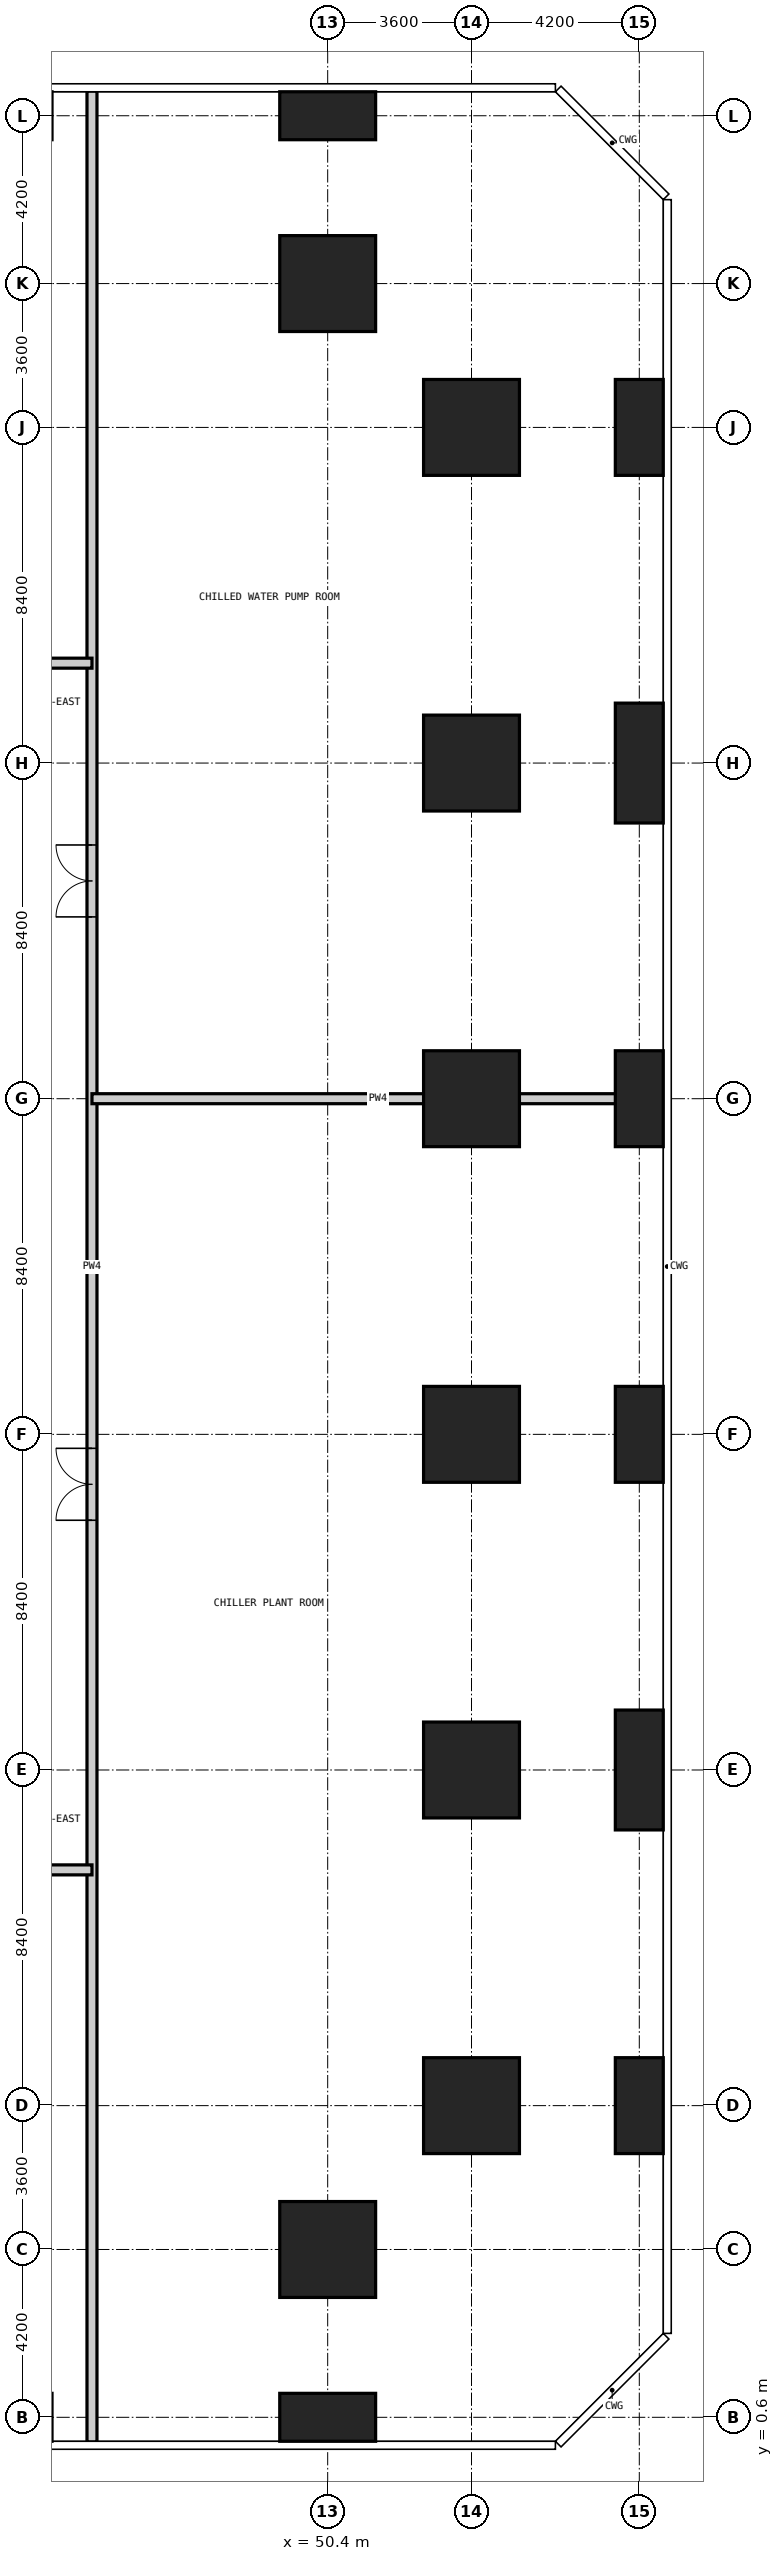
"""IFC4 building model, lengths in metres.
Left out: names, types, materials, properties, quantities, classifications, styles, units other than length and angle.
Written with IfcOpenShell. Run it as: python <this file> out.ifc"""

import sys

from ifc_helpers import new_model, si_unit, direction, frame, frame_2d, origin, origin_2d, place, context, subcontext, project, spatial, rectangle, extrude, element, fill, save


model = new_model("IFC4")
c1 = context("Model", 3, precision=1e-05, world=origin(), true_north=direction((0.0, 1.0)))
c2 = subcontext(c1, "Body", "Model", "MODEL_VIEW")
j1 = project(units=[si_unit("LENGTHUNIT", "METRE"), si_unit("PLANEANGLEUNIT", "RADIAN")], contexts=[c1])
p1 = place(None, origin())
s1 = spatial("IfcSite", under=j1, at=p1, CompositionType="ELEMENT")
p2 = place(p1, origin())
s2 = spatial("IfcBuilding", under=s1, at=p2, CompositionType="ELEMENT")
p3 = place(p2, frame((0.0, 0.0, 88.2)))
s3 = spatial("IfcBuildingStorey", under=s2, at=p3, CompositionType="ELEMENT", Elevation=88.2)
p4 = place(p3, frame((50.4, 0.6, -0.4), z_axis=(0.0, 0.0, 1.0), x_axis=(1.0, 0.0, 0.0)))
e1 = element("IfcColumn", 1, at=p4, inside=s3, PredefinedType="COLUMN", context=c2, shape_type="SweptSolid", body=[
    extrude(rectangle(XDim=2.4, YDim=1.2, at=origin_2d()), origin(), (0.0, 0.0, 1.0), 5.45),
])
for number, where, z_axis, x_axis in (
    (2, (50.4, 4.8, -0.4), (0.0, 0.0, 1.0), (1.0, 0.0, 0.0)),
    (3, (50.4, 54.0, -0.4), (0.0, 0.0, 1.0), (1.0, 0.0, 0.0)),
):
    element("IfcColumn", number, at=place(p3, frame(where, z_axis=z_axis, x_axis=x_axis)), inside=s3, PredefinedType="COLUMN", context=c2, shape_type="SweptSolid", body=[
        extrude(rectangle(XDim=2.4, YDim=2.4, at=origin_2d()), origin(), (0.0, 0.0, 1.0), 5.45),
    ])
p5 = place(p3, frame((50.4, 58.2, -0.4), z_axis=(0.0, 0.0, 1.0), x_axis=(1.0, 0.0, 0.0)))
e4 = element("IfcColumn", 4, at=p5, inside=s3, PredefinedType="COLUMN", context=c2, shape_type="SweptSolid", body=[
    extrude(rectangle(XDim=2.4, YDim=1.2, at=origin_2d()), origin(), (0.0, 0.0, 1.0), 5.45),
])
for number, where, z_axis, x_axis in (
    (5, (54.0, 8.4, -0.4), (0.0, 0.0, 1.0), (1.0, 0.0, 0.0)),
    (6, (54.0, 16.8, -0.4), (0.0, 0.0, 1.0), (1.0, 0.0, 0.0)),
    (7, (54.0, 25.2, -0.4), (0.0, 0.0, 1.0), (1.0, 0.0, 0.0)),
    (8, (54.0, 33.6, -0.4), (0.0, 0.0, 1.0), (1.0, 0.0, 0.0)),
    (9, (54.0, 42.0, -0.4), (0.0, 0.0, 1.0), (1.0, 0.0, 0.0)),
    (10, (54.0, 50.4, -0.4), (0.0, 0.0, 1.0), (1.0, 0.0, 0.0)),
):
    element("IfcColumn", number, at=place(p3, frame(where, z_axis=z_axis, x_axis=x_axis)), inside=s3, PredefinedType="COLUMN", context=c2, shape_type="SweptSolid", body=[
        extrude(rectangle(XDim=2.4, YDim=2.4, at=origin_2d()), origin(), (0.0, 0.0, 1.0), 5.45),
    ])
p6 = place(p3, frame((58.2, 8.4, -0.4), z_axis=(0.0, 0.0, 1.0), x_axis=(1.0, 0.0, 0.0)))
e11 = element("IfcColumn", 11, at=p6, inside=s3, PredefinedType="COLUMN", context=c2, shape_type="SweptSolid", body=[
    extrude(rectangle(XDim=1.2, YDim=2.4, at=origin_2d()), origin(), (0.0, 0.0, 1.0), 5.45),
])
p7 = place(p3, frame((58.2, 16.8, -0.4), z_axis=(0.0, 0.0, 1.0), x_axis=(1.0, 0.0, 0.0)))
e12 = element("IfcColumn", 12, at=p7, inside=s3, PredefinedType="COLUMN", context=c2, shape_type="SweptSolid", body=[
    extrude(rectangle(XDim=1.2, YDim=3.0, at=origin_2d()), origin(), (0.0, 0.0, 1.0), 5.45),
])
for number, where, z_axis, x_axis in (
    (13, (58.2, 25.2, -0.4), (0.0, 0.0, 1.0), (1.0, 0.0, 0.0)),
    (14, (58.2, 33.6, -0.4), (0.0, 0.0, 1.0), (1.0, 0.0, 0.0)),
):
    element("IfcColumn", number, at=place(p3, frame(where, z_axis=z_axis, x_axis=x_axis)), inside=s3, PredefinedType="COLUMN", context=c2, shape_type="SweptSolid", body=[
        extrude(rectangle(XDim=1.2, YDim=2.4, at=origin_2d()), origin(), (0.0, 0.0, 1.0), 5.45),
    ])
p8 = place(p3, frame((58.2, 42.0, -0.4), z_axis=(0.0, 0.0, 1.0), x_axis=(1.0, 0.0, 0.0)))
e15 = element("IfcColumn", 15, at=p8, inside=s3, PredefinedType="COLUMN", context=c2, shape_type="SweptSolid", body=[
    extrude(rectangle(XDim=1.2, YDim=3.0, at=origin_2d()), origin(), (0.0, 0.0, 1.0), 5.45),
])
p9 = place(p3, frame((58.2, 50.4, -0.4), z_axis=(0.0, 0.0, 1.0), x_axis=(1.0, 0.0, 0.0)))
e16 = element("IfcColumn", 16, at=p9, inside=s3, PredefinedType="COLUMN", context=c2, shape_type="SweptSolid", body=[
    extrude(rectangle(XDim=1.2, YDim=2.4, at=origin_2d()), origin(), (0.0, 0.0, 1.0), 5.45),
])
p10 = place(p3, frame((44.5, -0.018, 0.0), z_axis=(0.0, 0.0, 1.0), x_axis=(0.0, 1.0, 0.0)))
e17 = element("IfcWall", 17, at=p10, inside=s3, PredefinedType="PARTITIONING", context=c2, shape_type="SweptSolid", body=[
    extrude(rectangle(XDim=58.836, YDim=0.25, at=frame_2d((29.418, 0.0))), origin(), (0.0, 0.0, 1.0), 5.05),
])
p11 = place(p10, frame((23.068, 0.0, 0.0)))
e18 = element("IfcOpeningElement", 18, at=p11, cuts=e17, PredefinedType="OPENING", context=c2, shape_type="SweptSolid", body=[
    extrude(rectangle(XDim=1.8, YDim=2.4, at=frame_2d((0.9, 1.2))), frame((0.0, 0.135, 0.0), z_axis=(0.0, -1.0, 0.0), x_axis=(1.0, 0.0, 0.0)), (0.0, 0.0, 1.0), 0.27),
])
p12 = place(p10, frame((38.168, 0.0, 0.0)))
e19 = element("IfcOpeningElement", 19, at=p12, cuts=e17, PredefinedType="OPENING", context=c2, shape_type="SweptSolid", body=[
    extrude(rectangle(XDim=1.8, YDim=2.4, at=frame_2d((0.9, 1.2))), frame((0.0, 0.135, 0.0), z_axis=(0.0, -1.0, 0.0), x_axis=(1.0, 0.0, 0.0)), (0.0, 0.0, 1.0), 0.27),
])
p13 = place(p3, frame((14.3, 14.3, 0.0), z_axis=(0.0, 0.0, 1.0), x_axis=(1.0, 0.0, 0.0)))
e20 = element("IfcWall", 20, at=p13, inside=s3, PredefinedType="PARTITIONING", context=c2, shape_type="SweptSolid", body=[
    extrude(rectangle(XDim=30.2, YDim=0.25, at=frame_2d((15.1, 0.0))), origin(), (0.0, 0.0, 1.0), 5.05),
])
p14 = place(p13, frame((19.65, 0.0, 0.0)))
e21 = element("IfcOpeningElement", 21, at=p14, cuts=e20, PredefinedType="OPENING", context=c2, shape_type="SweptSolid", body=[
    extrude(rectangle(XDim=1.8, YDim=2.4, at=frame_2d((0.9, 1.2))), frame((0.0, 0.135, 0.0), z_axis=(0.0, -1.0, 0.0), x_axis=(1.0, 0.0, 0.0)), (0.0, 0.0, 1.0), 0.27),
])
p15 = place(p13, frame((4.55, 0.0, 0.0)))
e22 = element("IfcOpeningElement", 22, at=p15, cuts=e20, PredefinedType="OPENING", context=c2, shape_type="SweptSolid", body=[
    extrude(rectangle(XDim=1.8, YDim=2.4, at=frame_2d((0.9, 1.2))), frame((0.0, 0.135, 0.0), z_axis=(0.0, -1.0, 0.0), x_axis=(1.0, 0.0, 0.0)), (0.0, 0.0, 1.0), 0.27),
])
p16 = place(p3, frame((44.5, 33.6, 0.0), z_axis=(0.0, 0.0, 1.0), x_axis=(1.0, 0.0, 0.0)))
e23 = element("IfcWall", 23, at=p16, inside=s3, PredefinedType="PARTITIONING", context=c2, shape_type="SweptSolid", body=[
    extrude(rectangle(XDim=14.318, YDim=0.25, at=frame_2d((7.159, 0.0))), origin(), (0.0, 0.0, 1.0), 5.05),
])
p17 = place(p3, frame((14.3, 44.5, 0.0), z_axis=(0.0, 0.0, 1.0), x_axis=(1.0, 0.0, 0.0)))
e24 = element("IfcWall", 24, at=p17, inside=s3, PredefinedType="PARTITIONING", context=c2, shape_type="SweptSolid", body=[
    extrude(rectangle(XDim=30.2, YDim=0.25, at=frame_2d((15.1, 0.0))), origin(), (0.0, 0.0, 1.0), 5.05),
])
p18 = place(p17, frame((19.65, 0.0, 0.0)))
e25 = element("IfcOpeningElement", 25, at=p18, cuts=e24, PredefinedType="OPENING", context=c2, shape_type="SweptSolid", body=[
    extrude(rectangle(XDim=1.8, YDim=2.4, at=frame_2d((0.9, 1.2))), frame((0.0, 0.135, 0.0), z_axis=(0.0, -1.0, 0.0), x_axis=(1.0, 0.0, 0.0)), (0.0, 0.0, 1.0), 0.27),
])
p19 = place(p11, origin())
e26 = element("IfcDoor", 26, at=p19, inside=s3, OperationType="DOUBLE_DOOR_DOUBLE_SWING", PredefinedType="DOOR", context=c2, shape_type="SweptSolid", body=[
    extrude(rectangle(XDim=1.8, YDim=2.4, at=frame_2d((0.9, 1.2))), frame((0.0, 0.025, 0.0), z_axis=(0.0, -1.0, 0.0), x_axis=(1.0, 0.0, 0.0)), (0.0, 0.0, 1.0), 0.05),
])
fill(e18, e26)
p20 = place(p12, origin())
e27 = element("IfcDoor", 27, at=p20, inside=s3, OperationType="DOUBLE_DOOR_DOUBLE_SWING", PredefinedType="DOOR", context=c2, shape_type="SweptSolid", body=[
    extrude(rectangle(XDim=1.8, YDim=2.4, at=frame_2d((0.9, 1.2))), frame((0.0, 0.025, 0.0), z_axis=(0.0, -1.0, 0.0), x_axis=(1.0, 0.0, 0.0)), (0.0, 0.0, 1.0), 0.05),
])
fill(e19, e27)
save(model, sys.argv[1])
